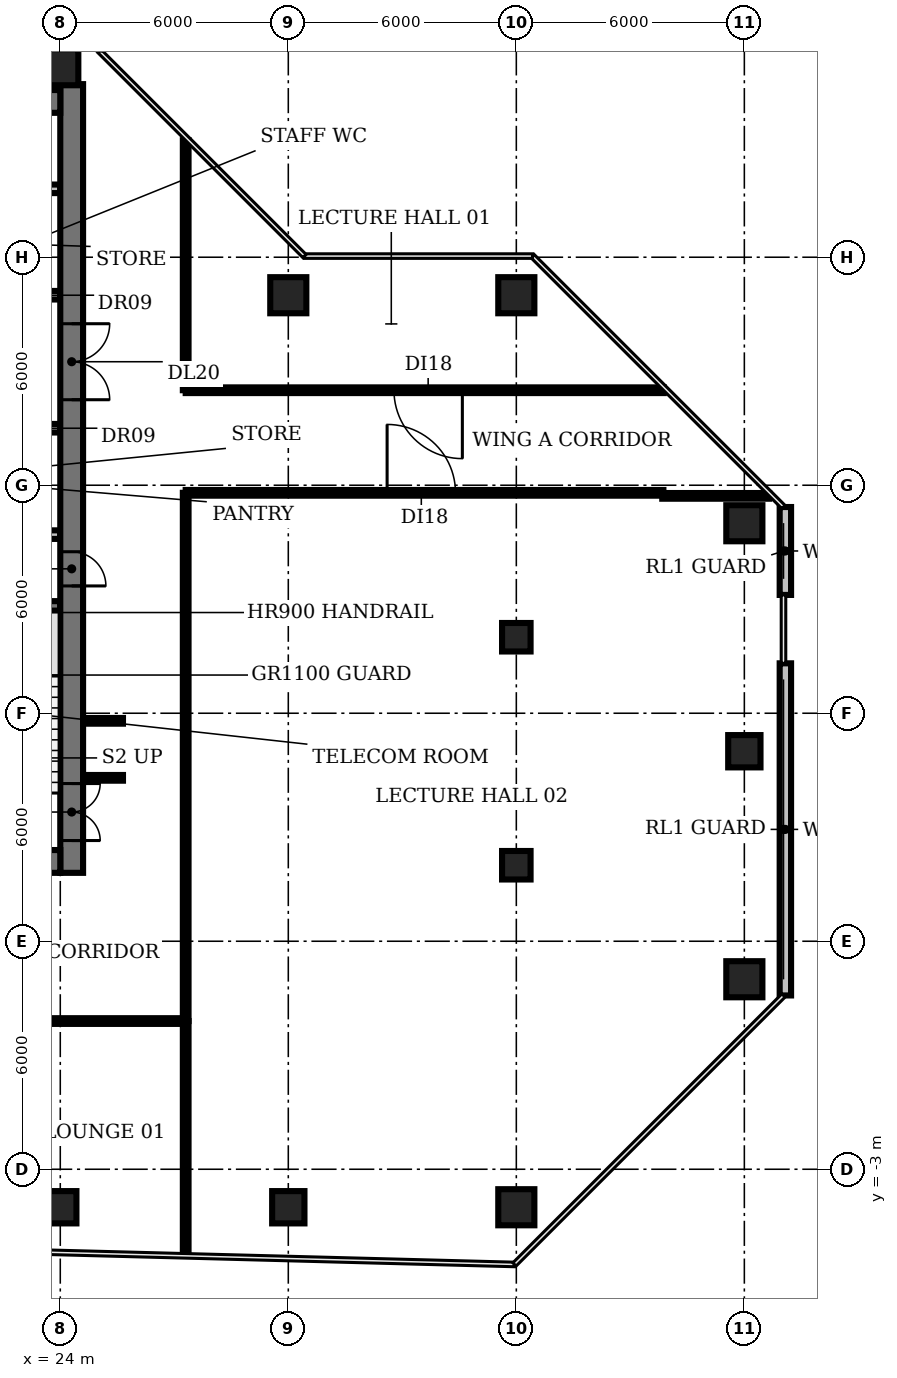
"""IFC4 building model, lengths in metres.
Left out: names, types, materials, properties, quantities, classifications, styles, units other than length and angle.
Written with IfcOpenShell. Run it as: python <this file> out.ifc"""

import sys

from ifc_helpers import new_model, si_unit, direction, frame, frame_2d, origin, origin_2d, place, context, subcontext, project, spatial, rectangle, circle, extrude, element, fill, save


model = new_model("IFC4")
c1 = context("Model", 3, precision=1e-05, world=origin(), true_north=direction((0.0, 1.0)))
c2 = subcontext(c1, "Body", "Model", "MODEL_VIEW")
j1 = project(units=[si_unit("LENGTHUNIT", "METRE"), si_unit("PLANEANGLEUNIT", "RADIAN")], contexts=[c1])
p1 = place(None, origin())
s1 = spatial("IfcSite", under=j1, at=p1, CompositionType="ELEMENT")
p2 = place(p1, origin())
s2 = spatial("IfcBuilding", under=s1, at=p2, CompositionType="ELEMENT")
p3 = place(p2, frame((0.0, 0.0, 163.4)))
s3 = spatial("IfcBuildingStorey", under=s2, at=p3, CompositionType="ELEMENT", Elevation=163.4)
p4 = place(p3, frame((24.0, -4.0, 0.0), z_axis=(0.0, 0.0, 1.0), x_axis=(1.0, 0.0, 0.0)))
e1 = element("IfcColumn", 1, at=p4, inside=s3, PredefinedType="COLUMN", context=c2, shape_type="SweptSolid", body=[
    extrude(rectangle(XDim=0.85, YDim=0.85, at=origin_2d()), origin(), (0.0, 0.0, 1.0), 3.85),
])
p5 = place(p3, frame((24.0, 26.0, 0.0), z_axis=(0.0, 0.0, 1.0), x_axis=(1.0, 0.0, 0.0)))
e2 = element("IfcColumn", 2, at=p5, inside=s3, PredefinedType="COLUMN", context=c2, shape_type="SweptSolid", body=[
    extrude(circle(Radius=0.475, at=origin_2d()), origin(), (0.0, 0.0, 1.0), 3.85),
])
p6 = place(p3, frame((30.0, -4.0, 0.0), z_axis=(0.0, 0.0, 1.0), x_axis=(1.0, 0.0, 0.0)))
e3 = element("IfcColumn", 3, at=p6, inside=s3, PredefinedType="COLUMN", context=c2, shape_type="SweptSolid", body=[
    extrude(rectangle(XDim=0.85, YDim=0.85, at=origin_2d()), origin(), (0.0, 0.0, 1.0), 3.85),
])
for number, where, z_axis, x_axis in (
    (4, (30.0, 20.0, 0.0), (0.0, 0.0, 1.0), (1.0, 0.0, 0.0)),
    (5, (36.0, -4.0, 0.0), (0.0, 0.0, 1.0), (1.0, 0.0, 0.0)),
):
    element("IfcColumn", number, at=place(p3, frame(where, z_axis=z_axis, x_axis=x_axis)), inside=s3, PredefinedType="COLUMN", context=c2, shape_type="SweptSolid", body=[
        extrude(circle(Radius=0.475, at=origin_2d()), origin(), (0.0, 0.0, 1.0), 3.85),
    ])
for number, where, z_axis, x_axis in (
    (6, (36.0, 5.0, 0.0), (0.0, 0.0, 1.0), (1.0, 0.0, 0.0)),
    (7, (36.0, 11.0, 0.0), (0.0, 0.0, 1.0), (1.0, 0.0, 0.0)),
):
    element("IfcColumn", number, at=place(p3, frame(where, z_axis=z_axis, x_axis=x_axis)), inside=s3, PredefinedType="COLUMN", context=c2, shape_type="SweptSolid", body=[
        extrude(rectangle(XDim=0.75, YDim=0.75, at=origin_2d()), origin(), (0.0, 0.0, 1.0), 3.85),
    ])
for number, where, z_axis, x_axis in (
    (8, (36.0, 20.0, 0.0), (0.0, 0.0, 1.0), (1.0, 0.0, 0.0)),
    (9, (42.0, 2.0, 0.0), (0.0, 0.0, 1.0), (1.0, 0.0, 0.0)),
):
    element("IfcColumn", number, at=place(p3, frame(where, z_axis=z_axis, x_axis=x_axis)), inside=s3, PredefinedType="COLUMN", context=c2, shape_type="SweptSolid", body=[
        extrude(circle(Radius=0.475, at=origin_2d()), origin(), (0.0, 0.0, 1.0), 3.85),
    ])
p7 = place(p3, frame((42.0, 8.0, 0.0), z_axis=(0.0, 0.0, 1.0), x_axis=(1.0, 0.0, 0.0)))
e10 = element("IfcColumn", 10, at=p7, inside=s3, PredefinedType="COLUMN", context=c2, shape_type="SweptSolid", body=[
    extrude(rectangle(XDim=0.85, YDim=0.85, at=origin_2d()), origin(), (0.0, 0.0, 1.0), 3.85),
])
p8 = place(p3, frame((42.0, 14.0, 0.0), z_axis=(0.0, 0.0, 1.0), x_axis=(1.0, 0.0, 0.0)))
e11 = element("IfcColumn", 11, at=p8, inside=s3, PredefinedType="COLUMN", context=c2, shape_type="SweptSolid", body=[
    extrude(circle(Radius=0.475, at=origin_2d()), origin(), (0.0, 0.0, 1.0), 3.85),
])
p9 = place(p3, frame((43.08, 1.573, 0.0), z_axis=(0.0, 0.0, 1.0), x_axis=(0.0, 1.0, 0.0)))
e12 = element("IfcWall", 12, at=p9, inside=s3, PredefinedType="SOLIDWALL", context=c2, shape_type="SweptSolid", body=[
    extrude(rectangle(XDim=8.74, YDim=0.3, at=frame_2d((4.37, 0.0))), origin(), (0.0, 0.0, 1.0), 3.85),
])
p10 = place(p3, frame((43.08, 12.113, 0.0), z_axis=(0.0, 0.0, 1.0), x_axis=(0.0, 1.0, 0.0)))
e13 = element("IfcWall", 13, at=p10, inside=s3, PredefinedType="SOLIDWALL", context=c2, shape_type="SweptSolid", body=[
    extrude(rectangle(XDim=2.313, YDim=0.3, at=frame_2d((1.157, 0.0))), origin(), (0.0, 0.0, 1.0), 3.85),
])
p11 = place(p3, frame((20.85, 11.825, 0.0), z_axis=(0.0, 0.0, 1.0), x_axis=(1.0, 0.0, 0.0)))
e14 = element("IfcWall", 14, at=p11, inside=s3, PredefinedType="SHEAR", context=c2, shape_type="SweptSolid", body=[
    extrude(rectangle(XDim=3.15, YDim=0.25, at=frame_2d((1.575, 0.0))), origin(), (0.0, 0.0, 1.0), 3.85),
])
p12 = place(p3, frame((16.6, 13.7, 0.0), z_axis=(0.0, 0.0, 1.0), x_axis=(1.0, 0.0, 0.0)))
e15 = element("IfcWall", 15, at=p12, inside=s3, PredefinedType="PARTITIONING", context=c2, shape_type="SweptSolid", body=[
    extrude(rectangle(XDim=7.4, YDim=0.225, at=frame_2d((3.7, 0.0))), origin(), (0.0, 0.0, 1.0), 3.85),
])
p13 = place(p3, frame((9.4, 16.5, 0.0), z_axis=(0.0, 0.0, 1.0), x_axis=(1.0, 0.0, 0.0)))
e16 = element("IfcWall", 16, at=p13, inside=s3, PredefinedType="PARTITIONING", context=c2, shape_type="SweptSolid", body=[
    extrude(rectangle(XDim=14.6, YDim=0.225, at=frame_2d((7.3, 0.0))), origin(), (0.0, 0.0, 1.0), 3.85),
])
p14 = place(p13, frame((1.6, 0.0, 0.0)))
e17 = element("IfcOpeningElement", 17, at=p14, cuts=e16, PredefinedType="OPENING", context=c2, shape_type="SweptSolid", body=[
    extrude(rectangle(XDim=1.0, YDim=2.1, at=frame_2d((0.5, 1.05))), frame((0.0, 0.123, 0.0), z_axis=(0.0, -1.0, 0.0), x_axis=(1.0, 0.0, 0.0)), (0.0, 0.0, 1.0), 0.245),
])
p15 = place(p13, frame((5.125, 0.0, 0.0)))
e18 = element("IfcOpeningElement", 18, at=p15, cuts=e16, PredefinedType="OPENING", context=c2, shape_type="SweptSolid", body=[
    extrude(rectangle(XDim=0.9, YDim=2.1, at=frame_2d((0.45, 1.05))), frame((0.0, 0.123, 0.0), z_axis=(0.0, -1.0, 0.0), x_axis=(1.0, 0.0, 0.0)), (0.0, 0.0, 1.0), 0.245),
])
p16 = place(p13, frame((7.675, 0.0, 0.0)))
e19 = element("IfcOpeningElement", 19, at=p16, cuts=e16, PredefinedType="OPENING", context=c2, shape_type="SweptSolid", body=[
    extrude(rectangle(XDim=0.9, YDim=2.1, at=frame_2d((0.45, 1.05))), frame((0.0, 0.123, 0.0), z_axis=(0.0, -1.0, 0.0), x_axis=(1.0, 0.0, 0.0)), (0.0, 0.0, 1.0), 0.245),
])
p17 = place(p13, frame((9.775, 0.0, 0.0)))
e20 = element("IfcOpeningElement", 20, at=p17, cuts=e16, PredefinedType="OPENING", context=c2, shape_type="SweptSolid", body=[
    extrude(rectangle(XDim=0.9, YDim=2.1, at=frame_2d((0.45, 1.05))), frame((0.0, 0.123, 0.0), z_axis=(0.0, -1.0, 0.0), x_axis=(1.0, 0.0, 0.0)), (0.0, 0.0, 1.0), 0.245),
])
p18 = place(p13, frame((11.647, 0.0, 0.0)))
e21 = element("IfcOpeningElement", 21, at=p18, cuts=e16, PredefinedType="OPENING", context=c2, shape_type="SweptSolid", body=[
    extrude(rectangle(XDim=0.9, YDim=2.1, at=frame_2d((0.45, 1.05))), frame((0.0, 0.123, 0.0), z_axis=(0.0, -1.0, 0.0), x_axis=(1.0, 0.0, 0.0)), (0.0, 0.0, 1.0), 0.245),
])
p19 = place(p13, frame((13.423, 0.0, 0.0)))
e22 = element("IfcOpeningElement", 22, at=p19, cuts=e16, PredefinedType="OPENING", context=c2, shape_type="SweptSolid", body=[
    extrude(rectangle(XDim=0.9, YDim=2.1, at=frame_2d((0.45, 1.05))), frame((0.0, 0.123, 0.0), z_axis=(0.0, -1.0, 0.0), x_axis=(1.0, 0.0, 0.0)), (0.0, 0.0, 1.0), 0.245),
])
p20 = place(p3, frame((24.0, 20.0, 0.0), z_axis=(0.0, 0.0, 1.0), x_axis=(-1.0, 0.0, 0.0)))
e23 = element("IfcWall", 23, at=p20, inside=s3, PredefinedType="PARTITIONING", context=c2, shape_type="SweptSolid", body=[
    extrude(rectangle(XDim=14.6, YDim=0.225, at=frame_2d((7.3, 0.0))), origin(), (0.0, 0.0, 1.0), 3.85),
])
p21 = place(p20, frame((12.75, 0.0, 0.0)))
e24 = element("IfcOpeningElement", 24, at=p21, cuts=e23, PredefinedType="OPENING", context=c2, shape_type="SweptSolid", body=[
    extrude(rectangle(XDim=1.1, YDim=2.1, at=frame_2d((0.55, 1.05))), frame((0.0, 0.123, 0.0), z_axis=(0.0, -1.0, 0.0), x_axis=(1.0, 0.0, 0.0)), (0.0, 0.0, 1.0), 0.245),
])
p22 = place(p20, frame((9.95, 0.0, 0.0)))
e25 = element("IfcOpeningElement", 25, at=p22, cuts=e23, PredefinedType="OPENING", context=c2, shape_type="SweptSolid", body=[
    extrude(rectangle(XDim=1.1, YDim=2.1, at=frame_2d((0.55, 1.05))), frame((0.0, 0.123, 0.0), z_axis=(0.0, -1.0, 0.0), x_axis=(1.0, 0.0, 0.0)), (0.0, 0.0, 1.0), 0.245),
])
p23 = place(p20, frame((7.15, 0.0, 0.0)))
e26 = element("IfcOpeningElement", 26, at=p23, cuts=e23, PredefinedType="OPENING", context=c2, shape_type="SweptSolid", body=[
    extrude(rectangle(XDim=1.1, YDim=2.1, at=frame_2d((0.55, 1.05))), frame((0.0, 0.123, 0.0), z_axis=(0.0, -1.0, 0.0), x_axis=(1.0, 0.0, 0.0)), (0.0, 0.0, 1.0), 0.245),
])
p24 = place(p20, frame((4.35, 0.0, 0.0)))
e27 = element("IfcOpeningElement", 27, at=p24, cuts=e23, PredefinedType="OPENING", context=c2, shape_type="SweptSolid", body=[
    extrude(rectangle(XDim=1.1, YDim=2.1, at=frame_2d((0.55, 1.05))), frame((0.0, 0.123, 0.0), z_axis=(0.0, -1.0, 0.0), x_axis=(1.0, 0.0, 0.0)), (0.0, 0.0, 1.0), 0.245),
])
p25 = place(p20, frame((2.137, 0.0, 0.0)))
e28 = element("IfcOpeningElement", 28, at=p25, cuts=e23, PredefinedType="OPENING", context=c2, shape_type="SweptSolid", body=[
    extrude(rectangle(XDim=0.9, YDim=2.1, at=frame_2d((0.45, 1.05))), frame((0.0, 0.123, 0.0), z_axis=(0.0, -1.0, 0.0), x_axis=(1.0, 0.0, 0.0)), (0.0, 0.0, 1.0), 0.245),
])
p26 = place(p20, frame((0.363, 0.0, 0.0)))
e29 = element("IfcOpeningElement", 29, at=p26, cuts=e23, PredefinedType="OPENING", context=c2, shape_type="SweptSolid", body=[
    extrude(rectangle(XDim=0.9, YDim=2.1, at=frame_2d((0.45, 1.05))), frame((0.0, 0.123, 0.0), z_axis=(0.0, -1.0, 0.0), x_axis=(1.0, 0.0, 0.0)), (0.0, 0.0, 1.0), 0.245),
])
p27 = place(p3, frame((9.4, 22.8, 0.0), z_axis=(0.0, 0.0, 1.0), x_axis=(1.0, 0.0, 0.0)))
e30 = element("IfcWall", 30, at=p27, inside=s3, PredefinedType="PARTITIONING", context=c2, shape_type="SweptSolid", body=[
    extrude(rectangle(XDim=14.6, YDim=0.225, at=frame_2d((7.3, 0.0))), origin(), (0.0, 0.0, 1.0), 3.85),
])
p28 = place(p3, frame((24.3, 25.555, 0.0), z_axis=(0.0, 0.0, 1.0), x_axis=(0.0, -1.0, 0.0)))
e31 = element("IfcWall", 31, at=p28, inside=s3, PredefinedType="SHEAR", context=c2, shape_type="SweptSolid", body=[
    extrude(rectangle(XDim=20.755, YDim=0.6, at=frame_2d((10.377, 0.0))), origin(), (0.0, 0.0, 1.0), 3.85),
])
p29 = place(p28, frame((18.405, 0.0, 0.0)))
e32 = element("IfcOpeningElement", 32, at=p29, cuts=e31, PredefinedType="OPENING", context=c2, shape_type="SweptSolid", body=[
    extrude(rectangle(XDim=1.5, YDim=2.1, at=frame_2d((0.75, 1.05))), frame((0.0, 0.31, 0.0), z_axis=(0.0, -1.0, 0.0), x_axis=(1.0, 0.0, 0.0)), (0.0, 0.0, 1.0), 0.62),
])
p30 = place(p28, frame((12.305, 0.0, 0.0)))
e33 = element("IfcOpeningElement", 33, at=p30, cuts=e31, PredefinedType="OPENING", context=c2, shape_type="SweptSolid", body=[
    extrude(rectangle(XDim=0.9, YDim=2.1, at=frame_2d((0.45, 1.05))), frame((0.0, 0.31, 0.0), z_axis=(0.0, -1.0, 0.0), x_axis=(1.0, 0.0, 0.0)), (0.0, 0.0, 1.0), 0.62),
])
p31 = place(p28, frame((6.305, 0.0, 0.0)))
e34 = element("IfcOpeningElement", 34, at=p31, cuts=e31, PredefinedType="OPENING", context=c2, shape_type="SweptSolid", body=[
    extrude(rectangle(XDim=2.0, YDim=2.1, at=frame_2d((1.0, 1.05))), frame((0.0, 0.31, 0.0), z_axis=(0.0, -1.0, 0.0), x_axis=(1.0, 0.0, 0.0)), (0.0, 0.0, 1.0), 0.62),
])
p32 = place(p3, frame((24.0, 5.1, 0.0), z_axis=(0.0, 0.0, 1.0), x_axis=(-1.0, 0.0, 0.0)))
e35 = element("IfcWall", 35, at=p32, inside=s3, PredefinedType="SHEAR", context=c2, shape_type="SweptSolid", body=[
    extrude(rectangle(XDim=18.0, YDim=0.6, at=frame_2d((9.0, 0.0))), origin(), (0.0, 0.0, 1.0), 3.85),
])
p33 = place(p32, frame((13.0, 0.0, 0.0)))
e36 = element("IfcOpeningElement", 36, at=p33, cuts=e35, PredefinedType="OPENING", context=c2, shape_type="SweptSolid", body=[
    extrude(rectangle(XDim=1.2, YDim=2.1, at=frame_2d((0.6, 1.05))), frame((0.0, 0.31, 0.0), z_axis=(0.0, -1.0, 0.0), x_axis=(1.0, 0.0, 0.0)), (0.0, 0.0, 1.0), 0.62),
])
p34 = place(p32, frame((4.9, 0.0, 0.0)))
e37 = element("IfcOpeningElement", 37, at=p34, cuts=e35, PredefinedType="OPENING", context=c2, shape_type="SweptSolid", body=[
    extrude(rectangle(XDim=1.0, YDim=2.1, at=frame_2d((0.5, 1.05))), frame((0.0, 0.31, 0.0), z_axis=(0.0, -1.0, 0.0), x_axis=(1.0, 0.0, 0.0)), (0.0, 0.0, 1.0), 0.62),
])
p35 = place(p3, frame((6.0, 25.1, 0.0), z_axis=(0.0, 0.0, 1.0), x_axis=(1.0, 0.0, 0.0)))
e38 = element("IfcWall", 38, at=p35, inside=s3, PredefinedType="SHEAR", context=c2, shape_type="SweptSolid", body=[
    extrude(rectangle(XDim=18.0, YDim=0.6, at=frame_2d((9.0, 0.0))), origin(), (0.0, 0.0, 1.0), 3.85),
])
for number, where, z_axis, x_axis in (
    (39, (24.6, 7.3, 0.0), (0.0, 0.0, 1.0), (1.0, 0.0, 0.0)),
    (40, (24.6, 8.8, 0.0), (0.0, 0.0, 1.0), (1.0, 0.0, 0.0)),
):
    element("IfcWall", number, at=place(p3, frame(where, z_axis=z_axis, x_axis=x_axis)), inside=s3, PredefinedType="PARTITIONING", context=c2, shape_type="SweptSolid", body=[
        extrude(rectangle(XDim=1.05, YDim=0.15, at=frame_2d((0.525, 0.0))), origin(), (0.0, 0.0, 1.0), 2.88),
    ])
p36 = place(p3, frame((27.3, -5.23, 0.0), z_axis=(0.0, 0.0, 1.0), x_axis=(0.0, 1.0, 0.0)))
e41 = element("IfcWall", 41, at=p36, inside=s3, PredefinedType="PARTITIONING", context=c2, shape_type="SweptSolid", body=[
    extrude(rectangle(XDim=6.13, YDim=0.15, at=frame_2d((3.065, 0.0))), origin(), (0.0, 0.0, 1.0), 2.88),
])
p37 = place(p3, frame((27.3, 0.9, 0.0), z_axis=(0.0, 0.0, 1.0), x_axis=(-1.0, 0.0, 0.0)))
e42 = element("IfcWall", 42, at=p37, inside=s3, PredefinedType="PARTITIONING", context=c2, shape_type="SweptSolid", body=[
    extrude(rectangle(XDim=24.6, YDim=0.15, at=frame_2d((12.3, 0.0))), origin(), (0.0, 0.0, 1.0), 2.88),
])
p38 = place(p37, frame((11.8, 0.0, 0.0)))
e43 = element("IfcOpeningElement", 43, at=p38, cuts=e42, PredefinedType="OPENING", context=c2, shape_type="SweptSolid", body=[
    extrude(rectangle(XDim=1.2, YDim=2.1, at=frame_2d((0.6, 1.05))), frame((0.0, 0.085, 0.0), z_axis=(0.0, -1.0, 0.0), x_axis=(1.0, 0.0, 0.0)), (0.0, 0.0, 1.0), 0.17),
])
p39 = place(p3, frame((27.3, 0.9, 0.0), z_axis=(0.0, 0.0, 1.0), x_axis=(0.0, 1.0, 0.0)))
e44 = element("IfcWall", 44, at=p39, inside=s3, PredefinedType="PARTITIONING", context=c2, shape_type="SweptSolid", body=[
    extrude(rectangle(XDim=13.9, YDim=0.15, at=frame_2d((6.95, 0.0))), origin(), (0.0, 0.0, 1.0), 2.88),
])
p40 = place(p3, frame((27.3, 14.8, 0.0), z_axis=(0.0, 0.0, 1.0), x_axis=(1.0, 0.0, 0.0)))
e45 = element("IfcWall", 45, at=p40, inside=s3, PredefinedType="PARTITIONING", context=c2, shape_type="SweptSolid", body=[
    extrude(rectangle(XDim=12.57, YDim=0.15, at=frame_2d((6.285, 0.0))), origin(), (0.0, 0.0, 1.0), 2.88),
])
p41 = place(p40, frame((5.3, 0.0, 0.0)))
e46 = element("IfcOpeningElement", 46, at=p41, cuts=e45, PredefinedType="OPENING", context=c2, shape_type="SweptSolid", body=[
    extrude(rectangle(XDim=1.8, YDim=2.1, at=frame_2d((0.9, 1.05))), frame((0.0, 0.085, 0.0), z_axis=(0.0, -1.0, 0.0), x_axis=(1.0, 0.0, 0.0)), (0.0, 0.0, 1.0), 0.17),
])
p42 = place(p3, frame((27.3, 17.5, 0.0), z_axis=(0.0, 0.0, 1.0), x_axis=(0.0, 1.0, 0.0)))
e47 = element("IfcWall", 47, at=p42, inside=s3, PredefinedType="PARTITIONING", context=c2, shape_type="SweptSolid", body=[
    extrude(rectangle(XDim=6.58, YDim=0.15, at=frame_2d((3.29, 0.0))), origin(), (0.0, 0.0, 1.0), 2.88),
])
p43 = place(p3, frame((39.84, 14.72, 0.0), z_axis=(0.0, 0.0, 1.0), x_axis=(1.0, 0.0, 0.0)))
e48 = element("IfcWall", 48, at=p43, inside=s3, PredefinedType="PARTITIONING", context=c2, shape_type="SweptSolid", body=[
    extrude(rectangle(XDim=2.812, YDim=0.15, at=frame_2d((1.406, 0.0))), origin(), (0.0, 0.0, 1.0), 2.88),
])
p44 = place(p3, frame((39.88, 17.5, 0.0), z_axis=(0.0, 0.0, 1.0), x_axis=(-1.0, 0.0, 0.0)))
e49 = element("IfcWall", 49, at=p44, inside=s3, PredefinedType="PARTITIONING", context=c2, shape_type="SweptSolid", body=[
    extrude(rectangle(XDim=12.58, YDim=0.15, at=frame_2d((6.29, 0.0))), origin(), (0.0, 0.0, 1.0), 2.88),
])
p45 = place(p44, frame((5.3, 0.0, 0.0)))
e50 = element("IfcOpeningElement", 50, at=p45, cuts=e49, PredefinedType="OPENING", context=c2, shape_type="SweptSolid", body=[
    extrude(rectangle(XDim=1.8, YDim=2.1, at=frame_2d((0.9, 1.05))), frame((0.0, 0.085, 0.0), z_axis=(0.0, -1.0, 0.0), x_axis=(1.0, 0.0, 0.0)), (0.0, 0.0, 1.0), 0.17),
])
p46 = place(p29, origin())
e51 = element("IfcDoor", 51, at=p46, inside=s3, OperationType="DOUBLE_DOOR_SINGLE_SWING", PredefinedType="DOOR", context=c2, shape_type="SweptSolid", body=[
    extrude(rectangle(XDim=1.5, YDim=2.1, at=frame_2d((0.75, 1.05))), frame((0.0, 0.025, 0.0), z_axis=(0.0, -1.0, 0.0), x_axis=(1.0, 0.0, 0.0)), (0.0, 0.0, 1.0), 0.05),
])
fill(e32, e51)
p47 = place(p30, origin())
e52 = element("IfcDoor", 52, at=p47, inside=s3, OperationType="SINGLE_SWING_RIGHT", PredefinedType="DOOR", context=c2, shape_type="SweptSolid", body=[
    extrude(rectangle(XDim=0.9, YDim=2.1, at=frame_2d((0.45, 1.05))), frame((0.0, -0.24, 0.0), z_axis=(0.0, -1.0, 0.0), x_axis=(1.0, 0.0, 0.0)), (0.0, 0.0, 1.0), 0.05),
])
fill(e33, e52)
p48 = place(p31, origin())
e53 = element("IfcDoor", 53, at=p48, inside=s3, OperationType="DOUBLE_DOOR_SINGLE_SWING", PredefinedType="DOOR", context=c2, shape_type="SweptSolid", body=[
    extrude(rectangle(XDim=2.0, YDim=2.1, at=frame_2d((1.0, 1.05))), frame((0.0, 0.025, 0.0), z_axis=(0.0, -1.0, 0.0), x_axis=(1.0, 0.0, 0.0)), (0.0, 0.0, 1.0), 0.05),
])
fill(e34, e53)
p49 = place(p41, origin())
e54 = element("IfcDoor", 54, at=p49, inside=s3, OperationType="SINGLE_SWING_LEFT", PredefinedType="DOOR", context=c2, shape_type="SweptSolid", body=[
    extrude(rectangle(XDim=1.8, YDim=2.1, at=frame_2d((0.9, 1.05))), frame((0.0, 0.025, 0.0), z_axis=(0.0, -1.0, 0.0), x_axis=(1.0, 0.0, 0.0)), (0.0, 0.0, 1.0), 0.05),
])
fill(e46, e54)
p50 = place(p45, origin())
e55 = element("IfcDoor", 55, at=p50, inside=s3, OperationType="SINGLE_SWING_LEFT", PredefinedType="DOOR", context=c2, shape_type="SweptSolid", body=[
    extrude(rectangle(XDim=1.8, YDim=2.1, at=frame_2d((0.9, 1.05))), frame((0.0, 0.025, 0.0), z_axis=(0.0, -1.0, 0.0), x_axis=(1.0, 0.0, 0.0)), (0.0, 0.0, 1.0), 0.05),
])
fill(e50, e55)
save(model, sys.argv[1])
